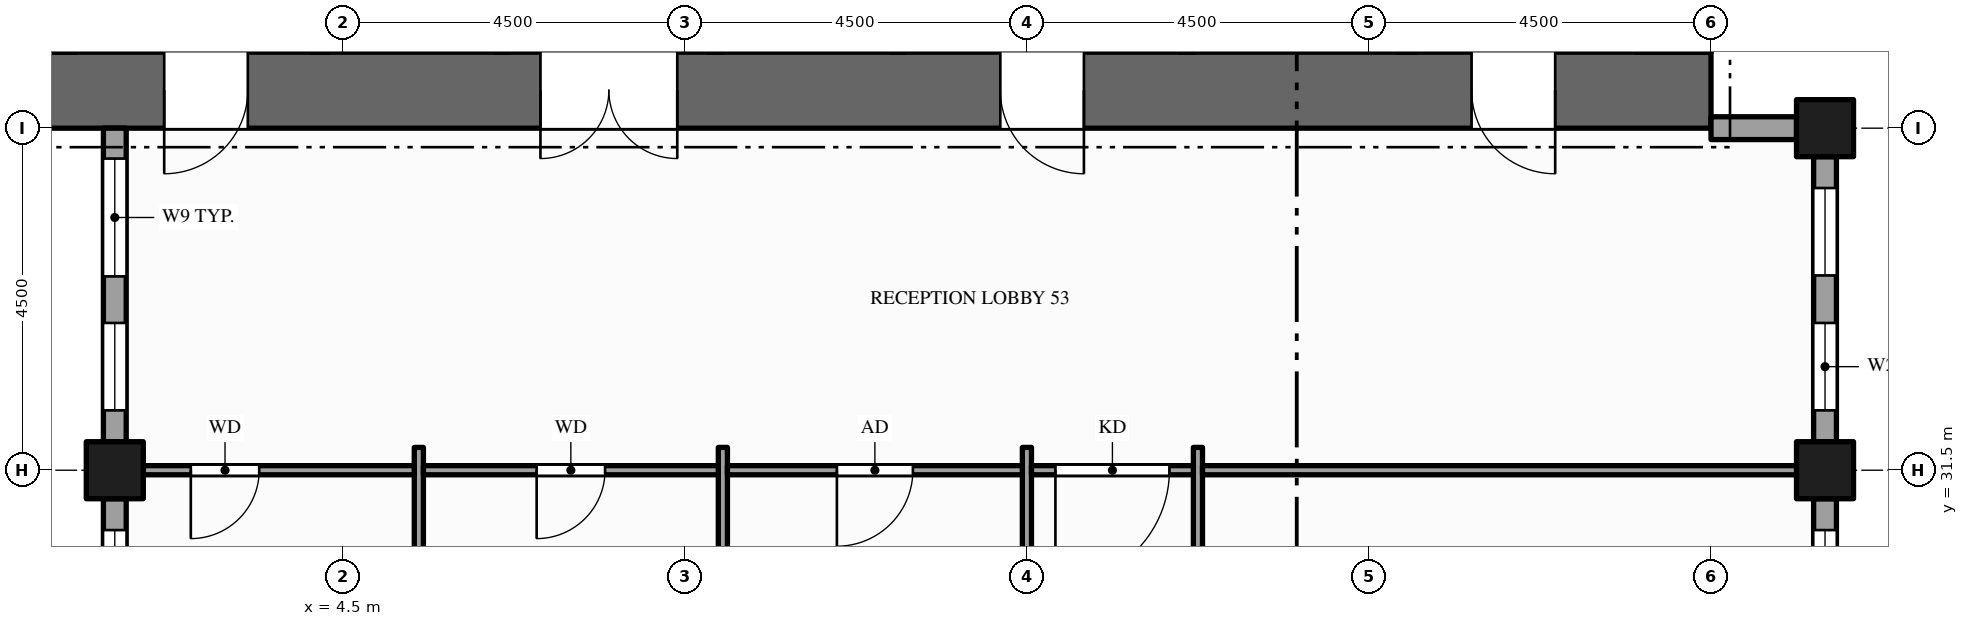
"""IFC4 building model, lengths in metres.
Left out: names, types, materials, properties, quantities, classifications, styles, units other than length and angle.
Written with IfcOpenShell. Run it as: python <this file> out.ifc"""

import sys

from ifc_helpers import new_model, si_unit, direction, frame, frame_2d, origin, origin_2d, place, context, subcontext, project, spatial, rectangle, hollow_rectangle, extrude, element, fill, save


model = new_model("IFC4")
c1 = context("Model", 3, precision=1e-05, world=origin(), true_north=direction((0.0, 1.0)))
c2 = subcontext(c1, "Body", "Model", "MODEL_VIEW")
j1 = project(units=[si_unit("LENGTHUNIT", "METRE"), si_unit("PLANEANGLEUNIT", "RADIAN")], contexts=[c1])
p1 = place(None, origin())
s1 = spatial("IfcSite", under=j1, at=p1, CompositionType="ELEMENT")
p2 = place(p1, origin())
s2 = spatial("IfcBuilding", under=s1, at=p2, CompositionType="ELEMENT")
p3 = place(p2, frame((0.0, 0.0, 227.0)))
s3 = spatial("IfcBuildingStorey", under=s2, at=p3, CompositionType="ELEMENT", Elevation=227.0)
p4 = place(p3, frame((0.0, 36.5, -0.15), z_axis=(0.0, 0.0, 1.0), x_axis=(1.0, 0.0, 0.0)))
e1 = element("IfcWall", 1, at=p4, inside=s3, PredefinedType="SHEAR", context=c2, shape_type="SweptSolid", body=[
    extrude(rectangle(XDim=22.5, YDim=1.0, at=frame_2d((11.25, 0.0))), origin(), (0.0, 0.0, 1.0), 4.0),
])
p5 = place(p4, frame((7.1, 0.0, 0.15)))
e2 = element("IfcOpeningElement", 2, at=p5, cuts=e1, PredefinedType="OPENING", context=c2, shape_type="SweptSolid", body=[
    extrude(rectangle(XDim=1.8, YDim=2.1, at=frame_2d((0.9, 1.05))), frame((0.0, 0.51, 0.0), z_axis=(0.0, -1.0, 0.0), x_axis=(1.0, 0.0, 0.0)), (0.0, 0.0, 1.0), 1.02),
])
p6 = place(p4, frame((13.15, 0.0, 0.15)))
e3 = element("IfcOpeningElement", 3, at=p6, cuts=e1, PredefinedType="OPENING", context=c2, shape_type="SweptSolid", body=[
    extrude(rectangle(XDim=1.1, YDim=2.1, at=frame_2d((0.55, 1.05))), frame((0.0, 0.51, 0.0), z_axis=(0.0, -1.0, 0.0), x_axis=(1.0, 0.0, 0.0)), (0.0, 0.0, 1.0), 1.02),
])
p7 = place(p4, frame((2.15, 0.0, 0.15)))
e4 = element("IfcOpeningElement", 4, at=p7, cuts=e1, PredefinedType="OPENING", context=c2, shape_type="SweptSolid", body=[
    extrude(rectangle(XDim=1.1, YDim=2.1, at=frame_2d((0.55, 1.05))), frame((0.0, 0.51, 0.0), z_axis=(0.0, -1.0, 0.0), x_axis=(1.0, 0.0, 0.0)), (0.0, 0.0, 1.0), 1.02),
])
p8 = place(p4, frame((19.35, 0.0, 0.15)))
e5 = element("IfcOpeningElement", 5, at=p8, cuts=e1, PredefinedType="OPENING", context=c2, shape_type="SweptSolid", body=[
    extrude(rectangle(XDim=1.1, YDim=2.1, at=frame_2d((0.55, 1.05))), frame((0.0, 0.51, 0.0), z_axis=(0.0, -1.0, 0.0), x_axis=(1.0, 0.0, 0.0)), (0.0, 0.0, 1.0), 1.02),
])
for number, where, z_axis, x_axis in (
    (6, (1.5, 31.5, -0.15), (0.0, 0.0, 1.0), (1.0, 0.0, 0.0)),
    (7, (24.0, 31.5, -0.15), (0.0, 0.0, 1.0), (1.0, 0.0, 0.0)),
    (8, (24.0, 36.0, -0.15), (0.0, 0.0, 1.0), (1.0, 0.0, 0.0)),
):
    element("IfcColumn", number, at=place(p3, frame(where, z_axis=z_axis, x_axis=x_axis)), inside=s3, PredefinedType="COLUMN", context=c2, shape_type="SweptSolid", body=[
        extrude(hollow_rectangle(XDim=0.75, YDim=0.75, WallThickness=0.036, at=origin_2d()), origin(), (0.0, 0.0, 1.0), 4.0),
    ])
p9 = place(p3, frame((24.0, 25.875, 0.0), z_axis=(0.0, 0.0, 1.0), x_axis=(0.0, 1.0, 0.0)))
e9 = element("IfcWall", 9, at=p9, inside=s3, PredefinedType="STANDARD", context=c2, shape_type="SweptSolid", body=[
    extrude(rectangle(XDim=5.25, YDim=0.3, at=frame_2d((2.625, 0.0))), origin(), (0.0, 0.0, 1.0), 3.157),
])
p10 = place(p9, frame((1.425, 0.0, 0.9)))
e10 = element("IfcOpeningElement", 10, at=p10, cuts=e9, PredefinedType="OPENING", context=c2, shape_type="SweptSolid", body=[
    extrude(rectangle(XDim=1.65, YDim=2.0, at=frame_2d((0.825, 1.0))), frame((0.0, 0.16, 0.0), z_axis=(0.0, -1.0, 0.0), x_axis=(1.0, 0.0, 0.0)), (0.0, 0.0, 1.0), 0.32),
])
p11 = place(p9, frame((3.688, 0.0, 0.9)))
e11 = element("IfcOpeningElement", 11, at=p11, cuts=e9, PredefinedType="OPENING", context=c2, shape_type="SweptSolid", body=[
    extrude(rectangle(XDim=1.15, YDim=2.0, at=frame_2d((0.575, 1.0))), frame((0.0, 0.16, 0.0), z_axis=(0.0, -1.0, 0.0), x_axis=(1.0, 0.0, 0.0)), (0.0, 0.0, 1.0), 0.32),
])
p12 = place(p3, frame((24.0, 31.875, 0.0), z_axis=(0.0, 0.0, 1.0), x_axis=(0.0, 1.0, 0.0)))
e12 = element("IfcWall", 12, at=p12, inside=s3, PredefinedType="STANDARD", context=c2, shape_type="SweptSolid", body=[
    extrude(rectangle(XDim=3.75, YDim=0.3, at=frame_2d((1.875, 0.0))), origin(), (0.0, 0.0, 1.0), 3.157),
])
p13 = place(p12, frame((0.413, 0.0, 0.9)))
e13 = element("IfcOpeningElement", 13, at=p13, cuts=e12, PredefinedType="OPENING", context=c2, shape_type="SweptSolid", body=[
    extrude(rectangle(XDim=1.15, YDim=2.0, at=frame_2d((0.575, 1.0))), frame((0.0, 0.16, 0.0), z_axis=(0.0, -1.0, 0.0), x_axis=(1.0, 0.0, 0.0)), (0.0, 0.0, 1.0), 0.32),
])
p14 = place(p12, frame((2.188, 0.0, 0.9)))
e14 = element("IfcOpeningElement", 14, at=p14, cuts=e12, PredefinedType="OPENING", context=c2, shape_type="SweptSolid", body=[
    extrude(rectangle(XDim=1.15, YDim=2.0, at=frame_2d((0.575, 1.0))), frame((0.0, 0.16, 0.0), z_axis=(0.0, -1.0, 0.0), x_axis=(1.0, 0.0, 0.0)), (0.0, 0.0, 1.0), 0.32),
])
p15 = place(p3, frame((23.625, 36.0, 0.0), z_axis=(0.0, 0.0, 1.0), x_axis=(-1.0, 0.0, 0.0)))
e15 = element("IfcWall", 15, at=p15, inside=s3, PredefinedType="STANDARD", context=c2, shape_type="SweptSolid", body=[
    extrude(rectangle(XDim=1.125, YDim=0.3, at=frame_2d((0.562, 0.0))), origin(), (0.0, 0.0, 1.0), 2.87),
])
p16 = place(p3, frame((1.5, 36.0, 0.0), z_axis=(0.0, 0.0, 1.0), x_axis=(0.0, -1.0, 0.0)))
e16 = element("IfcWall", 16, at=p16, inside=s3, PredefinedType="STANDARD", context=c2, shape_type="SweptSolid", body=[
    extrude(rectangle(XDim=4.125, YDim=0.3, at=frame_2d((2.062, 0.0))), origin(), (0.0, 0.0, 1.0), 3.157),
])
p17 = place(p16, frame((0.4, 0.0, 0.9)))
e17 = element("IfcOpeningElement", 17, at=p17, cuts=e16, PredefinedType="OPENING", context=c2, shape_type="SweptSolid", body=[
    extrude(rectangle(XDim=1.55, YDim=2.0, at=frame_2d((0.775, 1.0))), frame((0.0, 0.16, 0.0), z_axis=(0.0, -1.0, 0.0), x_axis=(1.0, 0.0, 0.0)), (0.0, 0.0, 1.0), 0.32),
])
p18 = place(p16, frame((2.562, 0.0, 0.9)))
e18 = element("IfcOpeningElement", 18, at=p18, cuts=e16, PredefinedType="OPENING", context=c2, shape_type="SweptSolid", body=[
    extrude(rectangle(XDim=1.15, YDim=2.0, at=frame_2d((0.575, 1.0))), frame((0.0, 0.16, 0.0), z_axis=(0.0, -1.0, 0.0), x_axis=(1.0, 0.0, 0.0)), (0.0, 0.0, 1.0), 0.32),
])
p19 = place(p3, frame((1.5, 31.125, 0.0), z_axis=(0.0, 0.0, 1.0), x_axis=(0.0, -1.0, 0.0)))
e19 = element("IfcWall", 19, at=p19, inside=s3, PredefinedType="STANDARD", context=c2, shape_type="SweptSolid", body=[
    extrude(rectangle(XDim=3.75, YDim=0.3, at=frame_2d((1.875, 0.0))), origin(), (0.0, 0.0, 1.0), 3.157),
])
p20 = place(p19, frame((0.413, 0.0, 0.9)))
e20 = element("IfcOpeningElement", 20, at=p20, cuts=e19, PredefinedType="OPENING", context=c2, shape_type="SweptSolid", body=[
    extrude(rectangle(XDim=1.15, YDim=2.0, at=frame_2d((0.575, 1.0))), frame((0.0, 0.16, 0.0), z_axis=(0.0, -1.0, 0.0), x_axis=(1.0, 0.0, 0.0)), (0.0, 0.0, 1.0), 0.32),
])
p21 = place(p19, frame((2.188, 0.0, 0.9)))
e21 = element("IfcOpeningElement", 21, at=p21, cuts=e19, PredefinedType="OPENING", context=c2, shape_type="SweptSolid", body=[
    extrude(rectangle(XDim=1.15, YDim=2.0, at=frame_2d((0.575, 1.0))), frame((0.0, 0.16, 0.0), z_axis=(0.0, -1.0, 0.0), x_axis=(1.0, 0.0, 0.0)), (0.0, 0.0, 1.0), 0.32),
])
for number, where, z_axis, x_axis in (
    (22, (5.5, 26.7, 0.0), (0.0, 0.0, 1.0), (0.0, 1.0, 0.0)),
    (23, (9.5, 26.7, 0.0), (0.0, 0.0, 1.0), (0.0, 1.0, 0.0)),
):
    element("IfcWall", number, at=place(p3, frame(where, z_axis=z_axis, x_axis=x_axis)), inside=s3, PredefinedType="PARTITIONING", context=c2, shape_type="SweptSolid", body=[
        extrude(rectangle(XDim=5.1, YDim=0.12, at=frame_2d((2.55, 0.0))), origin(), (0.0, 0.0, 1.0), 3.85),
    ])
p22 = place(p3, frame((13.5, 10.95, 0.0), z_axis=(0.0, 0.0, 1.0), x_axis=(0.0, 1.0, 0.0)))
e24 = element("IfcWall", 24, at=p22, inside=s3, PredefinedType="PARTITIONING", context=c2, shape_type="SweptSolid", body=[
    extrude(rectangle(XDim=20.85, YDim=0.12, at=frame_2d((10.425, 0.0))), origin(), (0.0, 0.0, 1.0), 2.6),
])
p23 = place(p22, frame((3.175, 0.0, 0.0)))
e25 = element("IfcOpeningElement", 25, at=p23, cuts=e24, PredefinedType="OPENING", context=c2, shape_type="SweptSolid", body=[
    extrude(rectangle(XDim=1.0, YDim=2.1, at=frame_2d((0.5, 1.05))), frame((0.0, 0.07, 0.0), z_axis=(0.0, -1.0, 0.0), x_axis=(1.0, 0.0, 0.0)), (0.0, 0.0, 1.0), 0.14),
])
p24 = place(p22, frame((11.08, 0.0, 0.0)))
e26 = element("IfcOpeningElement", 26, at=p24, cuts=e24, PredefinedType="OPENING", context=c2, shape_type="SweptSolid", body=[
    extrude(rectangle(XDim=1.0, YDim=2.1, at=frame_2d((0.5, 1.05))), frame((0.0, 0.07, 0.0), z_axis=(0.0, -1.0, 0.0), x_axis=(1.0, 0.0, 0.0)), (0.0, 0.0, 1.0), 0.14),
])
p25 = place(p3, frame((15.75, 10.95, 0.0), z_axis=(0.0, 0.0, 1.0), x_axis=(0.0, 1.0, 0.0)))
e27 = element("IfcWall", 27, at=p25, inside=s3, PredefinedType="PARTITIONING", context=c2, shape_type="SweptSolid", body=[
    extrude(rectangle(XDim=20.85, YDim=0.12, at=frame_2d((10.425, 0.0))), origin(), (0.0, 0.0, 1.0), 2.6),
])
p26 = place(p25, frame((17.8, 0.0, 0.0)))
e28 = element("IfcOpeningElement", 28, at=p26, cuts=e27, PredefinedType="OPENING", context=c2, shape_type="SweptSolid", body=[
    extrude(rectangle(XDim=1.0, YDim=2.1, at=frame_2d((0.5, 1.05))), frame((0.0, 0.07, 0.0), z_axis=(0.0, -1.0, 0.0), x_axis=(1.0, 0.0, 0.0)), (0.0, 0.0, 1.0), 0.14),
])
p27 = place(p25, frame((4.2, 0.0, 0.0)))
e29 = element("IfcOpeningElement", 29, at=p27, cuts=e27, PredefinedType="OPENING", context=c2, shape_type="SweptSolid", body=[
    extrude(rectangle(XDim=1.2, YDim=2.1, at=frame_2d((0.6, 1.05))), frame((0.0, 0.07, 0.0), z_axis=(0.0, -1.0, 0.0), x_axis=(1.0, 0.0, 0.0)), (0.0, 0.0, 1.0), 0.14),
])
p28 = place(p3, frame((1.65, 31.5, 0.0), z_axis=(0.0, 0.0, 1.0), x_axis=(1.0, 0.0, 0.0)))
e30 = element("IfcWall", 30, at=p28, inside=s3, PredefinedType="PARTITIONING", context=c2, shape_type="SweptSolid", body=[
    extrude(rectangle(XDim=3.79, YDim=0.12, at=frame_2d((1.895, 0.0))), origin(), (0.0, 0.0, 1.0), 2.87),
])
p29 = place(p28, frame((0.85, 0.0, 0.0)))
e31 = element("IfcOpeningElement", 31, at=p29, cuts=e30, PredefinedType="OPENING", context=c2, shape_type="SweptSolid", body=[
    extrude(rectangle(XDim=0.9, YDim=2.1, at=frame_2d((0.45, 1.05))), frame((0.0, 0.07, 0.0), z_axis=(0.0, -1.0, 0.0), x_axis=(1.0, 0.0, 0.0)), (0.0, 0.0, 1.0), 0.14),
])
p30 = place(p3, frame((5.56, 31.5, 0.0), z_axis=(0.0, 0.0, 1.0), x_axis=(1.0, 0.0, 0.0)))
e32 = element("IfcWall", 32, at=p30, inside=s3, PredefinedType="PARTITIONING", context=c2, shape_type="SweptSolid", body=[
    extrude(rectangle(XDim=3.88, YDim=0.12, at=frame_2d((1.94, 0.0))), origin(), (0.0, 0.0, 1.0), 2.87),
])
p31 = place(p30, frame((1.49, 0.0, 0.0)))
e33 = element("IfcOpeningElement", 33, at=p31, cuts=e32, PredefinedType="OPENING", context=c2, shape_type="SweptSolid", body=[
    extrude(rectangle(XDim=0.9, YDim=2.1, at=frame_2d((0.45, 1.05))), frame((0.0, 0.07, 0.0), z_axis=(0.0, -1.0, 0.0), x_axis=(1.0, 0.0, 0.0)), (0.0, 0.0, 1.0), 0.14),
])
p32 = place(p3, frame((9.56, 31.5, 0.0), z_axis=(0.0, 0.0, 1.0), x_axis=(1.0, 0.0, 0.0)))
e34 = element("IfcWall", 34, at=p32, inside=s3, PredefinedType="PARTITIONING", context=c2, shape_type="SweptSolid", body=[
    extrude(rectangle(XDim=3.88, YDim=0.12, at=frame_2d((1.94, 0.0))), origin(), (0.0, 0.0, 1.0), 2.87),
])
p33 = place(p32, frame((1.44, 0.0, 0.0)))
e35 = element("IfcOpeningElement", 35, at=p33, cuts=e34, PredefinedType="OPENING", context=c2, shape_type="SweptSolid", body=[
    extrude(rectangle(XDim=1.0, YDim=2.1, at=frame_2d((0.5, 1.05))), frame((0.0, 0.07, 0.0), z_axis=(0.0, -1.0, 0.0), x_axis=(1.0, 0.0, 0.0)), (0.0, 0.0, 1.0), 0.14),
])
p34 = place(p3, frame((13.56, 31.5, 0.0), z_axis=(0.0, 0.0, 1.0), x_axis=(1.0, 0.0, 0.0)))
e36 = element("IfcWall", 36, at=p34, inside=s3, PredefinedType="PARTITIONING", context=c2, shape_type="SweptSolid", body=[
    extrude(rectangle(XDim=2.13, YDim=0.12, at=frame_2d((1.065, 0.0))), origin(), (0.0, 0.0, 1.0), 2.87),
])
p35 = place(p34, frame((0.315, 0.0, 0.0)))
e37 = element("IfcOpeningElement", 37, at=p35, cuts=e36, PredefinedType="OPENING", context=c2, shape_type="SweptSolid", body=[
    extrude(rectangle(XDim=1.5, YDim=2.1, at=frame_2d((0.75, 1.05))), frame((0.0, 0.07, 0.0), z_axis=(0.0, -1.0, 0.0), x_axis=(1.0, 0.0, 0.0)), (0.0, 0.0, 1.0), 0.14),
])
p36 = place(p3, frame((15.81, 31.5, 0.0), z_axis=(0.0, 0.0, 1.0), x_axis=(1.0, 0.0, 0.0)))
e38 = element("IfcWall", 38, at=p36, inside=s3, PredefinedType="PARTITIONING", context=c2, shape_type="SweptSolid", body=[
    extrude(rectangle(XDim=8.04, YDim=0.12, at=frame_2d((4.02, 0.0))), origin(), (0.0, 0.0, 1.0), 2.87),
])
p37 = place(p11, origin())
e39 = element("IfcWindow", 39, at=p37, inside=s3, PartitioningType="SINGLE_PANEL", PredefinedType="WINDOW", context=c2, shape_type="SweptSolid", body=[
    extrude(rectangle(XDim=1.15, YDim=2.0, at=frame_2d((0.575, 1.0))), frame((0.0, 0.03, 0.0), z_axis=(0.0, -1.0, 0.0), x_axis=(1.0, 0.0, 0.0)), (0.0, 0.0, 1.0), 0.06),
])
fill(e11, e39)
p38 = place(p13, origin())
e40 = element("IfcWindow", 40, at=p38, inside=s3, PartitioningType="SINGLE_PANEL", PredefinedType="WINDOW", context=c2, shape_type="SweptSolid", body=[
    extrude(rectangle(XDim=1.15, YDim=2.0, at=frame_2d((0.575, 1.0))), frame((0.0, 0.03, 0.0), z_axis=(0.0, -1.0, 0.0), x_axis=(1.0, 0.0, 0.0)), (0.0, 0.0, 1.0), 0.06),
])
fill(e13, e40)
p39 = place(p14, origin())
e41 = element("IfcWindow", 41, at=p39, inside=s3, PartitioningType="SINGLE_PANEL", PredefinedType="WINDOW", context=c2, shape_type="SweptSolid", body=[
    extrude(rectangle(XDim=1.15, YDim=2.0, at=frame_2d((0.575, 1.0))), frame((0.0, 0.03, 0.0), z_axis=(0.0, -1.0, 0.0), x_axis=(1.0, 0.0, 0.0)), (0.0, 0.0, 1.0), 0.06),
])
fill(e14, e41)
p40 = place(p17, origin())
e42 = element("IfcWindow", 42, at=p40, inside=s3, PartitioningType="SINGLE_PANEL", PredefinedType="WINDOW", context=c2, shape_type="SweptSolid", body=[
    extrude(rectangle(XDim=1.55, YDim=2.0, at=frame_2d((0.775, 1.0))), frame((0.0, 0.03, 0.0), z_axis=(0.0, -1.0, 0.0), x_axis=(1.0, 0.0, 0.0)), (0.0, 0.0, 1.0), 0.06),
])
fill(e17, e42)
p41 = place(p18, origin())
e43 = element("IfcWindow", 43, at=p41, inside=s3, PartitioningType="SINGLE_PANEL", PredefinedType="WINDOW", context=c2, shape_type="SweptSolid", body=[
    extrude(rectangle(XDim=1.15, YDim=2.0, at=frame_2d((0.575, 1.0))), frame((0.0, 0.03, 0.0), z_axis=(0.0, -1.0, 0.0), x_axis=(1.0, 0.0, 0.0)), (0.0, 0.0, 1.0), 0.06),
])
fill(e18, e43)
p42 = place(p20, origin())
e44 = element("IfcWindow", 44, at=p42, inside=s3, PartitioningType="SINGLE_PANEL", PredefinedType="WINDOW", context=c2, shape_type="SweptSolid", body=[
    extrude(rectangle(XDim=1.15, YDim=2.0, at=frame_2d((0.575, 1.0))), frame((0.0, 0.03, 0.0), z_axis=(0.0, -1.0, 0.0), x_axis=(1.0, 0.0, 0.0)), (0.0, 0.0, 1.0), 0.06),
])
fill(e20, e44)
p43 = place(p5, origin())
e45 = element("IfcDoor", 45, at=p43, inside=s3, OperationType="DOUBLE_DOOR_SINGLE_SWING", PredefinedType="DOOR", context=c2, shape_type="SweptSolid", body=[
    extrude(rectangle(XDim=1.8, YDim=2.1, at=frame_2d((0.9, 1.05))), frame((0.0, 0.025, 0.0), z_axis=(0.0, -1.0, 0.0), x_axis=(1.0, 0.0, 0.0)), (0.0, 0.0, 1.0), 0.05),
])
fill(e2, e45)
p44 = place(p6, origin())
e46 = element("IfcDoor", 46, at=p44, inside=s3, OperationType="SINGLE_SWING_RIGHT", PredefinedType="DOOR", context=c2, shape_type="SweptSolid", body=[
    extrude(rectangle(XDim=1.1, YDim=2.1, at=frame_2d((0.55, 1.05))), frame((0.0, 0.025, 0.0), z_axis=(0.0, -1.0, 0.0), x_axis=(1.0, 0.0, 0.0)), (0.0, 0.0, 1.0), 0.05),
])
fill(e3, e46)
p45 = place(p7, origin())
e47 = element("IfcDoor", 47, at=p45, inside=s3, OperationType="SINGLE_SWING_LEFT", PredefinedType="DOOR", context=c2, shape_type="SweptSolid", body=[
    extrude(rectangle(XDim=1.1, YDim=2.1, at=frame_2d((0.55, 1.05))), frame((0.0, 0.025, 0.0), z_axis=(0.0, -1.0, 0.0), x_axis=(1.0, 0.0, 0.0)), (0.0, 0.0, 1.0), 0.05),
])
fill(e4, e47)
p46 = place(p8, origin())
e48 = element("IfcDoor", 48, at=p46, inside=s3, OperationType="SINGLE_SWING_RIGHT", PredefinedType="DOOR", context=c2, shape_type="SweptSolid", body=[
    extrude(rectangle(XDim=1.1, YDim=2.1, at=frame_2d((0.55, 1.05))), frame((0.0, 0.025, 0.0), z_axis=(0.0, -1.0, 0.0), x_axis=(1.0, 0.0, 0.0)), (0.0, 0.0, 1.0), 0.05),
])
fill(e5, e48)
p47 = place(p35, origin())
e49 = element("IfcDoor", 49, at=p47, inside=s3, OperationType="SINGLE_SWING_LEFT", PredefinedType="DOOR", context=c2, shape_type="SweptSolid", body=[
    extrude(rectangle(XDim=1.5, YDim=2.1, at=frame_2d((0.75, 1.05))), frame((0.0, 0.025, 0.0), z_axis=(0.0, -1.0, 0.0), x_axis=(1.0, 0.0, 0.0)), (0.0, 0.0, 1.0), 0.05),
])
fill(e37, e49)
p48 = place(p29, origin())
e50 = element("IfcDoor", 50, at=p48, inside=s3, OperationType="SINGLE_SWING_LEFT", PredefinedType="DOOR", context=c2, shape_type="SweptSolid", body=[
    extrude(rectangle(XDim=0.9, YDim=2.1, at=frame_2d((0.45, 1.05))), frame((0.0, 0.025, 0.0), z_axis=(0.0, -1.0, 0.0), x_axis=(1.0, 0.0, 0.0)), (0.0, 0.0, 1.0), 0.05),
])
fill(e31, e50)
p49 = place(p31, origin())
e51 = element("IfcDoor", 51, at=p49, inside=s3, OperationType="SINGLE_SWING_LEFT", PredefinedType="DOOR", context=c2, shape_type="SweptSolid", body=[
    extrude(rectangle(XDim=0.9, YDim=2.1, at=frame_2d((0.45, 1.05))), frame((0.0, 0.025, 0.0), z_axis=(0.0, -1.0, 0.0), x_axis=(1.0, 0.0, 0.0)), (0.0, 0.0, 1.0), 0.05),
])
fill(e33, e51)
p50 = place(p33, origin())
e52 = element("IfcDoor", 52, at=p50, inside=s3, OperationType="SINGLE_SWING_LEFT", PredefinedType="DOOR", context=c2, shape_type="SweptSolid", body=[
    extrude(rectangle(XDim=1.0, YDim=2.1, at=frame_2d((0.5, 1.05))), frame((0.0, 0.025, 0.0), z_axis=(0.0, -1.0, 0.0), x_axis=(1.0, 0.0, 0.0)), (0.0, 0.0, 1.0), 0.05),
])
fill(e35, e52)
save(model, sys.argv[1])
